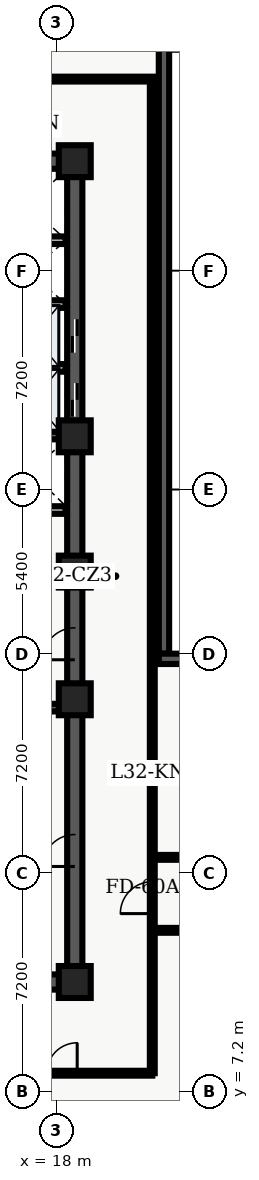
"""IFC4 building model, lengths in metres.
Left out: names, types, materials, properties, quantities, classifications, styles, units other than length and angle.
Written with IfcOpenShell. Run it as: python <this file> out.ifc"""

import sys

from ifc_helpers import new_model, entity, si_unit, converted_unit, direction, frame, origin_with_axes, origin_2d_with_axis, place, context, subcontext, project, spatial, polyline, rectangle, outline, extrude, element, fill, save


model = new_model("IFC4")
c1 = context("Model", 3, precision=1e-05, world=origin_with_axes(), true_north=direction((0.0, 1.0)))
c2 = subcontext(c1, "Body", "Model", "MODEL_VIEW")
j1 = project(units=[si_unit("LENGTHUNIT", "METRE"), converted_unit("PLANEANGLEUNIT", "DEGREE", entity("IfcPlaneAngleMeasure", 0.017), si_unit("PLANEANGLEUNIT", "RADIAN"), dimensions=[0, 0, 0, 0, 0, 0, 0])], contexts=[c1])
p1 = place(None, origin_with_axes())
s1 = spatial("IfcSite", under=j1, at=p1, CompositionType="ELEMENT")
p2 = place(p1, origin_with_axes())
s2 = spatial("IfcBuilding", under=s1, at=p2, CompositionType="ELEMENT")
p3 = place(p2, frame((0.0, 0.0, 132.9), z_axis=(0.0, 0.0, 1.0), x_axis=(1.0, 0.0, 0.0)))
s3 = spatial("IfcBuildingStorey", under=s2, at=p3, CompositionType="ELEMENT", Elevation=132.9)
p4 = place(p3, frame((11.4, 10.8, 0.0), z_axis=(0.0, 0.0, 1.0), x_axis=(1.0, 0.0, 0.0)))
e1 = element("IfcWall", 1, at=p4, inside=s3, PredefinedType="SHEAR", context=c2, shape_type="SweptSolid", body=[
    extrude(outline(polyline([(0.0, -0.25), (7.2, -0.25), (7.2, 0.25), (0.0, 0.25), (0.0, -0.25)])), origin_with_axes(), (0.0, 0.0, 1.0), 3.66),
])
p5 = place(p4, frame((2.625, 0.0, 0.0), z_axis=(0.0, 0.0, 1.0), x_axis=(1.0, 0.0, 0.0)))
e2 = element("IfcOpeningElement", 2, at=p5, cuts=e1, PredefinedType="OPENING", context=c2, shape_type="SweptSolid", body=[
    extrude(rectangle(XDim=1.05, YDim=0.52, at=origin_2d_with_axis()), origin_with_axes(), (0.0, 0.0, 1.0), 2.15),
])
p6 = place(p3, frame((11.4, 37.8, 0.0), z_axis=(0.0, 0.0, 1.0), x_axis=(1.0, 0.0, 0.0)))
e3 = element("IfcWall", 3, at=p6, inside=s3, PredefinedType="SHEAR", context=c2, shape_type="SweptSolid", body=[
    extrude(outline(polyline([(0.0, -0.25), (7.2, -0.25), (7.2, 0.25), (0.0, 0.25), (0.0, -0.25)])), origin_with_axes(), (0.0, 0.0, 1.0), 3.66),
])
p7 = place(p6, frame((2.625, 0.0, 0.0), z_axis=(0.0, 0.0, 1.0), x_axis=(1.0, 0.0, 0.0)))
e4 = element("IfcOpeningElement", 4, at=p7, cuts=e3, PredefinedType="OPENING", context=c2, shape_type="SweptSolid", body=[
    extrude(rectangle(XDim=1.05, YDim=0.52, at=origin_2d_with_axis()), origin_with_axes(), (0.0, 0.0, 1.0), 2.15),
])
p8 = place(p3, frame((18.6, 10.8, 0.0), z_axis=(0.0, 0.0, 1.0), x_axis=(0.0, 1.0, 0.0)))
e5 = element("IfcWall", 5, at=p8, inside=s3, PredefinedType="SHEAR", context=c2, shape_type="SweptSolid", body=[
    extrude(outline(polyline([(0.0, -0.25), (13.5, -0.25), (13.5, 0.25), (0.0, 0.25), (0.0, -0.25)])), origin_with_axes(), (0.0, 0.0, 1.0), 3.66),
])
p9 = place(p8, frame((11.125, 0.0, 0.0), z_axis=(0.0, 0.0, 1.0), x_axis=(1.0, 0.0, 0.0)))
e6 = element("IfcOpeningElement", 6, at=p9, cuts=e5, PredefinedType="OPENING", context=c2, shape_type="SweptSolid", body=[
    extrude(rectangle(XDim=1.05, YDim=0.52, at=origin_2d_with_axis()), origin_with_axes(), (0.0, 0.0, 1.0), 2.15),
])
p10 = place(p8, frame((4.325, 0.0, 0.0), z_axis=(0.0, 0.0, 1.0), x_axis=(1.0, 0.0, 0.0)))
e7 = element("IfcOpeningElement", 7, at=p10, cuts=e5, PredefinedType="OPENING", context=c2, shape_type="SweptSolid", body=[
    extrude(rectangle(XDim=1.05, YDim=0.52, at=origin_2d_with_axis()), origin_with_axes(), (0.0, 0.0, 1.0), 2.15),
])
p11 = place(p3, frame((18.6, 24.3, 0.0), z_axis=(0.0, 0.0, 1.0), x_axis=(0.0, 1.0, 0.0)))
e8 = element("IfcWall", 8, at=p11, inside=s3, PredefinedType="SHEAR", context=c2, shape_type="SweptSolid", body=[
    extrude(outline(polyline([(0.0, -0.25), (13.5, -0.25), (13.5, 0.25), (0.0, 0.25), (0.0, -0.25)])), origin_with_axes(), (0.0, 0.0, 1.0), 3.66),
])
p12 = place(p11, frame((5.65, 0.0, 0.0), z_axis=(0.0, 0.0, 1.0), x_axis=(1.0, 0.0, 0.0)))
e9 = element("IfcOpeningElement", 9, at=p12, cuts=e8, PredefinedType="OPENING", context=c2, shape_type="SweptSolid", body=[
    extrude(rectangle(XDim=1.1, YDim=0.52, at=origin_2d_with_axis()), origin_with_axes(), (0.0, 0.0, 1.0), 2.15),
])
p13 = place(p11, frame((7.75, 0.0, 0.0), z_axis=(0.0, 0.0, 1.0), x_axis=(1.0, 0.0, 0.0)))
e10 = element("IfcOpeningElement", 10, at=p13, cuts=e8, PredefinedType="OPENING", context=c2, shape_type="SweptSolid", body=[
    extrude(rectangle(XDim=1.1, YDim=0.52, at=origin_2d_with_axis()), origin_with_axes(), (0.0, 0.0, 1.0), 2.15),
])
for number, where, z_axis, x_axis in (
    (11, (11.65, 19.825, 0.0), (0.0, 0.0, 1.0), (1.0, 0.0, 0.0)),
    (12, (11.65, 28.775, 0.0), (0.0, 0.0, 1.0), (1.0, 0.0, 0.0)),
):
    element("IfcWall", number, at=place(p3, frame(where, z_axis=z_axis, x_axis=x_axis)), inside=s3, PredefinedType="SHEAR", context=c2, shape_type="SweptSolid", body=[
        extrude(outline(polyline([(0.0, -0.125), (6.7, -0.125), (6.7, 0.125), (0.0, 0.125), (0.0, -0.125)])), origin_with_axes(), (0.0, 0.0, 1.0), 3.66),
    ])
p14 = place(p3, frame((11.7, 24.1, 0.0), z_axis=(0.0, 0.0, 1.0), x_axis=(1.0, 0.0, 0.0)))
e13 = element("IfcWall", 13, at=p14, inside=s3, PredefinedType="SOLIDWALL", context=c2, shape_type="SweptSolid", body=[
    extrude(outline(polyline([(0.0, -0.125), (6.6, -0.125), (6.6, 0.125), (0.0, 0.125), (0.0, -0.125)])), origin_with_axes(), (0.0, 0.0, 1.0), 2.7),
])
p15 = place(p14, frame((3.75, 0.0, 0.0), z_axis=(0.0, 0.0, 1.0), x_axis=(1.0, 0.0, 0.0)))
e14 = element("IfcOpeningElement", 14, at=p15, cuts=e13, PredefinedType="OPENING", context=c2, shape_type="SweptSolid", body=[
    extrude(rectangle(XDim=0.9, YDim=0.27, at=origin_2d_with_axis()), origin_with_axes(), (0.0, 0.0, 1.0), 2.15),
])
p16 = place(p3, frame((11.7, 26.325, 0.0), z_axis=(0.0, 0.0, 1.0), x_axis=(1.0, 0.0, 0.0)))
e15 = element("IfcWall", 15, at=p16, inside=s3, PredefinedType="SOLIDWALL", context=c2, shape_type="SweptSolid", body=[
    extrude(outline(polyline([(0.0, -0.125), (6.6, -0.125), (6.6, 0.125), (0.0, 0.125), (0.0, -0.125)])), origin_with_axes(), (0.0, 0.0, 1.0), 2.7),
])
p17 = place(p16, frame((3.5, 0.0, 0.0), z_axis=(0.0, 0.0, 1.0), x_axis=(1.0, 0.0, 0.0)))
e16 = element("IfcOpeningElement", 16, at=p17, cuts=e15, PredefinedType="OPENING", context=c2, shape_type="SweptSolid", body=[
    extrude(rectangle(XDim=0.9, YDim=0.27, at=origin_2d_with_axis()), origin_with_axes(), (0.0, 0.0, 1.0), 2.15),
])
for number, where, z_axis, x_axis in (
    (17, (18.6, 10.8, 0.0), (0.0, 0.0, 1.0), (1.0, 0.0, 0.0)),
    (18, (18.6, 20.1, 0.0), (0.0, 0.0, 1.0), (1.0, 0.0, 0.0)),
    (19, (18.6, 24.3, 0.0), (0.0, 0.0, 1.0), (1.0, 0.0, 0.0)),
    (20, (18.6, 28.75, 0.0), (0.0, 0.0, 1.0), (1.0, 0.0, 0.0)),
    (21, (18.6, 37.8, 0.0), (0.0, 0.0, 1.0), (1.0, 0.0, 0.0)),
):
    element("IfcColumn", number, at=place(p3, frame(where, z_axis=z_axis, x_axis=x_axis)), inside=s3, PredefinedType="COLUMN", context=c2, shape_type="SweptSolid", body=[
        extrude(rectangle(XDim=1.05, YDim=1.05, at=origin_2d_with_axis()), origin_with_axes(), (0.0, 0.0, 1.0), 3.9),
    ])
for number, where, z_axis, x_axis in (
    (22, (15.84, 31.0, 0.0), (0.0, 0.0, 1.0), (1.0, 0.0, 0.0)),
    (23, (15.84, 33.1, 0.0), (0.0, 0.0, 1.0), (1.0, 0.0, 0.0)),
    (24, (15.84, 35.2, 0.0), (0.0, 0.0, 1.0), (1.0, 0.0, 0.0)),
):
    element("IfcWall", number, at=place(p3, frame(where, z_axis=z_axis, x_axis=x_axis)), inside=s3, PredefinedType="SOLIDWALL", context=c2, shape_type="SweptSolid", body=[
        extrude(outline(polyline([(0.0, -0.125), (2.46, -0.125), (2.46, 0.125), (0.0, 0.125), (0.0, -0.125)])), origin_with_axes(), (0.0, 0.0, 1.0), 2.7),
    ])
p18 = place(p3, frame((2.6, 7.8, 0.0), z_axis=(0.0, 0.0, 1.0), x_axis=(1.0, 0.0, 0.0)))
e25 = element("IfcWall", 25, at=p18, inside=s3, PredefinedType="PARTITIONING", context=c2, shape_type="SweptSolid", body=[
    extrude(outline(polyline([(0.0, -0.08), (18.55, -0.08), (18.55, 0.08), (0.0, 0.08), (0.0, -0.08)])), origin_with_axes(), (0.0, 0.0, 1.0), 2.7),
])
p19 = place(p18, frame((1.55, 0.0, 0.0), z_axis=(0.0, 0.0, 1.0), x_axis=(1.0, 0.0, 0.0)))
e26 = element("IfcOpeningElement", 26, at=p19, cuts=e25, PredefinedType="OPENING", context=c2, shape_type="SweptSolid", body=[
    extrude(rectangle(XDim=1.0, YDim=0.18, at=origin_2d_with_axis()), origin_with_axes(), (0.0, 0.0, 1.0), 2.15),
])
p20 = place(p18, frame((6.235, 0.0, 0.0), z_axis=(0.0, 0.0, 1.0), x_axis=(1.0, 0.0, 0.0)))
e27 = element("IfcOpeningElement", 27, at=p20, cuts=e25, PredefinedType="OPENING", context=c2, shape_type="SweptSolid", body=[
    extrude(rectangle(XDim=1.0, YDim=0.18, at=origin_2d_with_axis()), origin_with_axes(), (0.0, 0.0, 1.0), 2.15),
])
p21 = place(p18, frame((10.73, 0.0, 0.0), z_axis=(0.0, 0.0, 1.0), x_axis=(1.0, 0.0, 0.0)))
e28 = element("IfcOpeningElement", 28, at=p21, cuts=e25, PredefinedType="OPENING", context=c2, shape_type="SweptSolid", body=[
    extrude(rectangle(XDim=1.0, YDim=0.18, at=origin_2d_with_axis()), origin_with_axes(), (0.0, 0.0, 1.0), 2.15),
])
p22 = place(p18, frame((15.58, 0.0, 0.0), z_axis=(0.0, 0.0, 1.0), x_axis=(1.0, 0.0, 0.0)))
e29 = element("IfcOpeningElement", 29, at=p22, cuts=e25, PredefinedType="OPENING", context=c2, shape_type="SweptSolid", body=[
    extrude(rectangle(XDim=1.0, YDim=0.18, at=origin_2d_with_axis()), origin_with_axes(), (0.0, 0.0, 1.0), 2.15),
])
p23 = place(p3, frame((2.6, 40.5, 0.0), z_axis=(0.0, 0.0, 1.0), x_axis=(1.0, 0.0, 0.0)))
e30 = element("IfcWall", 30, at=p23, inside=s3, PredefinedType="PARTITIONING", context=c2, shape_type="SweptSolid", body=[
    extrude(outline(polyline([(0.0, -0.08), (18.769, -0.08), (18.769, 0.08), (0.0, 0.08), (0.0, -0.08)])), origin_with_axes(), (0.0, 0.0, 1.0), 2.7),
])
p24 = place(p23, frame((7.782, 0.0, 0.0), z_axis=(0.0, 0.0, 1.0), x_axis=(1.0, 0.0, 0.0)))
e31 = element("IfcOpeningElement", 31, at=p24, cuts=e30, PredefinedType="OPENING", context=c2, shape_type="SweptSolid", body=[
    extrude(rectangle(XDim=1.0, YDim=0.18, at=origin_2d_with_axis()), origin_with_axes(), (0.0, 0.0, 1.0), 2.15),
])
p25 = place(p3, frame((21.15, 7.8, 0.0), z_axis=(0.0, 0.0, 1.0), x_axis=(0.0, 1.0, 0.0)))
e32 = element("IfcWall", 32, at=p25, inside=s3, PredefinedType="PARTITIONING", context=c2, shape_type="SweptSolid", body=[
    extrude(outline(polyline([(0.0, -0.08), (32.7, -0.08), (32.7, 0.08), (0.0, 0.08), (0.0, -0.08)])), origin_with_axes(), (0.0, 0.0, 1.0), 2.7),
])
p26 = place(p25, frame((5.775, 0.0, 0.0), z_axis=(0.0, 0.0, 1.0), x_axis=(1.0, 0.0, 0.0)))
e33 = element("IfcOpeningElement", 33, at=p26, cuts=e32, PredefinedType="OPENING", context=c2, shape_type="SweptSolid", body=[
    extrude(rectangle(XDim=1.05, YDim=0.18, at=origin_2d_with_axis()), origin_with_axes(), (0.0, 0.0, 1.0), 2.15),
])
p27 = place(p3, frame((21.15, 12.5, 0.0), z_axis=(0.0, 0.0, 1.0), x_axis=(1.0, 0.0, 0.0)))
e34 = element("IfcWall", 34, at=p27, inside=s3, PredefinedType="PARTITIONING", context=c2, shape_type="SweptSolid", body=[
    extrude(outline(polyline([(0.0, -0.08), (15.2, -0.08), (15.2, 0.08), (0.0, 0.08), (0.0, -0.08)])), origin_with_axes(), (0.0, 0.0, 1.0), 2.7),
])
p28 = place(p27, frame((3.623, 0.0, 0.0), z_axis=(0.0, 0.0, 1.0), x_axis=(1.0, 0.0, 0.0)))
e35 = element("IfcOpeningElement", 35, at=p28, cuts=e34, PredefinedType="OPENING", context=c2, shape_type="SweptSolid", body=[
    extrude(rectangle(XDim=1.2, YDim=0.18, at=origin_2d_with_axis()), origin_with_axes(), (0.0, 0.0, 1.0), 2.2),
])
p29 = place(p27, frame((8.921, 0.0, 0.0), z_axis=(0.0, 0.0, 1.0), x_axis=(1.0, 0.0, 0.0)))
e36 = element("IfcOpeningElement", 36, at=p29, cuts=e34, PredefinedType="OPENING", context=c2, shape_type="SweptSolid", body=[
    extrude(rectangle(XDim=1.0, YDim=0.18, at=origin_2d_with_axis()), origin_with_axes(), (0.0, 0.0, 1.0), 2.15),
])
p30 = place(p27, frame((12.947, 0.0, 0.0), z_axis=(0.0, 0.0, 1.0), x_axis=(1.0, 0.0, 0.0)))
e37 = element("IfcOpeningElement", 37, at=p30, cuts=e34, PredefinedType="OPENING", context=c2, shape_type="SweptSolid", body=[
    extrude(rectangle(XDim=1.0, YDim=0.18, at=origin_2d_with_axis()), origin_with_axes(), (0.0, 0.0, 1.0), 2.15),
])
p31 = place(p3, frame((21.15, 14.9, 0.0), z_axis=(0.0, 0.0, 1.0), x_axis=(1.0, 0.0, 0.0)))
e38 = element("IfcWall", 38, at=p31, inside=s3, PredefinedType="PARTITIONING", context=c2, shape_type="SweptSolid", body=[
    extrude(outline(polyline([(0.0, -0.08), (15.2, -0.08), (15.2, 0.08), (0.0, 0.08), (0.0, -0.08)])), origin_with_axes(), (0.0, 0.0, 1.0), 2.7),
])
p32 = place(p31, frame((1.774, 0.0, 0.0), z_axis=(0.0, 0.0, 1.0), x_axis=(1.0, 0.0, 0.0)))
e39 = element("IfcOpeningElement", 39, at=p32, cuts=e38, PredefinedType="OPENING", context=c2, shape_type="SweptSolid", body=[
    extrude(rectangle(XDim=1.0, YDim=0.18, at=origin_2d_with_axis()), origin_with_axes(), (0.0, 0.0, 1.0), 2.15),
])
p33 = place(p31, frame((4.909, 0.0, 0.0), z_axis=(0.0, 0.0, 1.0), x_axis=(1.0, 0.0, 0.0)))
e40 = element("IfcOpeningElement", 40, at=p33, cuts=e38, PredefinedType="OPENING", context=c2, shape_type="SweptSolid", body=[
    extrude(rectangle(XDim=1.0, YDim=0.18, at=origin_2d_with_axis()), origin_with_axes(), (0.0, 0.0, 1.0), 2.15),
])
p34 = place(p31, frame((8.575, 0.0, 0.0), z_axis=(0.0, 0.0, 1.0), x_axis=(1.0, 0.0, 0.0)))
e41 = element("IfcOpeningElement", 41, at=p34, cuts=e38, PredefinedType="OPENING", context=c2, shape_type="SweptSolid", body=[
    extrude(rectangle(XDim=1.0, YDim=0.18, at=origin_2d_with_axis()), origin_with_axes(), (0.0, 0.0, 1.0), 2.15),
])
p35 = place(p31, frame((12.911, 0.0, 0.0), z_axis=(0.0, 0.0, 1.0), x_axis=(1.0, 0.0, 0.0)))
e42 = element("IfcOpeningElement", 42, at=p35, cuts=e38, PredefinedType="OPENING", context=c2, shape_type="SweptSolid", body=[
    extrude(rectangle(XDim=1.0, YDim=0.18, at=origin_2d_with_axis()), origin_with_axes(), (0.0, 0.0, 1.0), 2.15),
])
p36 = place(p3, frame((21.534, 46.7, 0.0), z_axis=(0.0, 0.0, 1.0), x_axis=(0.0, -1.0, 0.0)))
e43 = element("IfcWall", 43, at=p36, inside=s3, PredefinedType="SOLIDWALL", context=c2, shape_type="SweptSolid", body=[
    extrude(outline(polyline([(0.0, -0.17), (25.1, -0.17), (25.1, 0.17), (0.0, 0.17), (0.0, -0.17)])), origin_with_axes(), (0.0, 0.0, 1.0), 3.66),
])
p37 = place(p36, frame((2.99, 0.0, 0.45), z_axis=(0.0, 0.0, 1.0), x_axis=(1.0, 0.0, 0.0)))
e44 = element("IfcOpeningElement", 44, at=p37, cuts=e43, PredefinedType="OPENING", context=c2, shape_type="SweptSolid", body=[
    extrude(rectangle(XDim=1.6, YDim=0.36, at=origin_2d_with_axis()), origin_with_axes(), (0.0, 0.0, 1.0), 2.2),
])
p38 = place(p3, frame((21.364, 21.43, 0.0), z_axis=(0.0, 0.0, 1.0), x_axis=(1.0, 0.0, 0.0)))
e45 = element("IfcWall", 45, at=p38, inside=s3, PredefinedType="SOLIDWALL", context=c2, shape_type="SweptSolid", body=[
    extrude(outline(polyline([(0.0, -0.17), (17.036, -0.17), (17.036, 0.17), (0.0, 0.17), (0.0, -0.17)])), origin_with_axes(), (0.0, 0.0, 1.0), 3.66),
])
p39 = place(p38, frame((8.518, 0.0, 0.45), z_axis=(0.0, 0.0, 1.0), x_axis=(1.0, 0.0, 0.0)))
e46 = element("IfcOpeningElement", 46, at=p39, cuts=e45, PredefinedType="OPENING", context=c2, shape_type="SweptSolid", body=[
    extrude(rectangle(XDim=1.8, YDim=0.36, at=origin_2d_with_axis()), origin_with_axes(), (0.0, 0.0, 1.0), 2.1),
])
p40 = place(p38, frame((13.347, 0.0, 0.45), z_axis=(0.0, 0.0, 1.0), x_axis=(1.0, 0.0, 0.0)))
e47 = element("IfcOpeningElement", 47, at=p40, cuts=e45, PredefinedType="OPENING", context=c2, shape_type="SweptSolid", body=[
    extrude(rectangle(XDim=1.8, YDim=0.36, at=origin_2d_with_axis()), origin_with_axes(), (0.0, 0.0, 1.0), 2.1),
])
p41 = place(p11, frame((5.65, 0.0, 0.0), z_axis=(0.0, 0.0, 1.0), x_axis=(1.0, 0.0, 0.0)))
e48 = element("IfcDoor", 48, at=p41, inside=s3, OperationType="SLIDING_TO_LEFT", PredefinedType="DOOR", context=c2, shape_type="SweptSolid", body=[
    extrude(rectangle(XDim=1.1, YDim=0.09, at=origin_2d_with_axis()), origin_with_axes(), (0.0, 0.0, 1.0), 2.15),
])
fill(e9, e48)
p42 = place(p11, frame((7.75, 0.0, 0.0), z_axis=(0.0, 0.0, 1.0), x_axis=(1.0, 0.0, 0.0)))
e49 = element("IfcDoor", 49, at=p42, inside=s3, OperationType="SLIDING_TO_RIGHT", PredefinedType="DOOR", context=c2, shape_type="SweptSolid", body=[
    extrude(rectangle(XDim=1.1, YDim=0.09, at=origin_2d_with_axis()), origin_with_axes(), (0.0, 0.0, 1.0), 2.15),
])
fill(e10, e49)
p43 = place(p8, frame((11.125, 0.0, 0.0), z_axis=(0.0, 0.0, 1.0), x_axis=(1.0, 0.0, 0.0)))
e50 = element("IfcDoor", 50, at=p43, inside=s3, OperationType="SINGLE_SWING_LEFT", PredefinedType="DOOR", context=c2, shape_type="SweptSolid", body=[
    extrude(rectangle(XDim=1.05, YDim=0.09, at=origin_2d_with_axis()), origin_with_axes(), (0.0, 0.0, 1.0), 2.15),
])
fill(e6, e50)
p44 = place(p8, frame((4.325, 0.0, 0.0), z_axis=(0.0, 0.0, 1.0), x_axis=(1.0, 0.0, 0.0)))
e51 = element("IfcDoor", 51, at=p44, inside=s3, OperationType="SINGLE_SWING_LEFT", PredefinedType="DOOR", context=c2, shape_type="SweptSolid", body=[
    extrude(rectangle(XDim=1.05, YDim=0.09, at=origin_2d_with_axis()), origin_with_axes(), (0.0, 0.0, 1.0), 2.15),
])
fill(e7, e51)
p45 = place(p18, frame((15.58, 0.0, 0.0), z_axis=(0.0, 0.0, 1.0), x_axis=(1.0, 0.0, 0.0)))
e52 = element("IfcDoor", 52, at=p45, inside=s3, OperationType="SINGLE_SWING_RIGHT", PredefinedType="DOOR", context=c2, shape_type="SweptSolid", body=[
    extrude(rectangle(XDim=1.0, YDim=0.09, at=origin_2d_with_axis()), origin_with_axes(), (0.0, 0.0, 1.0), 2.15),
])
fill(e29, e52)
p46 = place(p25, frame((5.775, 0.0, 0.0), z_axis=(0.0, 0.0, 1.0), x_axis=(1.0, 0.0, 0.0)))
e53 = element("IfcDoor", 53, at=p46, inside=s3, OperationType="SINGLE_SWING_LEFT", PredefinedType="DOOR", context=c2, shape_type="SweptSolid", body=[
    extrude(rectangle(XDim=1.05, YDim=0.09, at=origin_2d_with_axis()), origin_with_axes(), (0.0, 0.0, 1.0), 2.15),
])
fill(e33, e53)
save(model, sys.argv[1])
